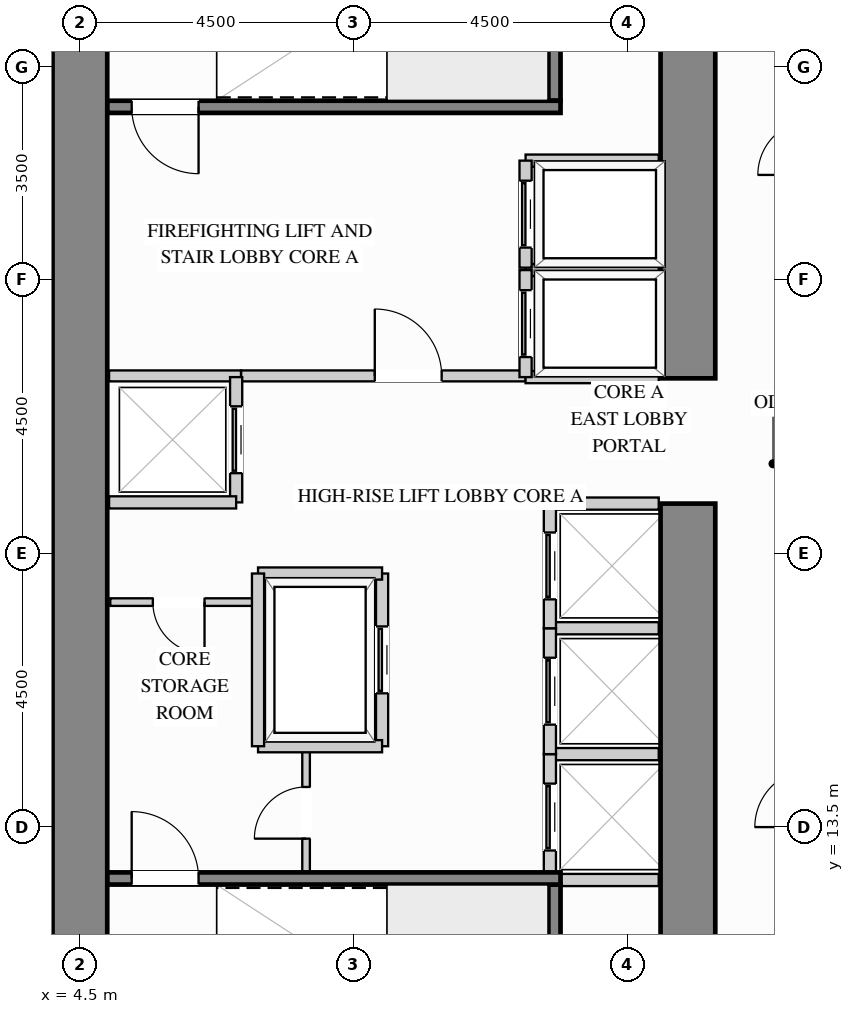
"""IFC4 building model, lengths in metres.
Left out: names, types, materials, properties, quantities, classifications, styles, units other than length and angle.
Written with IfcOpenShell. Run it as: python <this file> out.ifc"""

import sys

from ifc_helpers import new_model, si_unit, direction, frame, frame_2d, origin, place, context, subcontext, project, spatial, rectangle, extrude, source, transform, mapped, element, fill, save


model = new_model("IFC4")
c1 = context("Model", 3, precision=1e-05, world=origin(), true_north=direction((0.0, 1.0)))
c2 = subcontext(c1, "Body", "Model", "MODEL_VIEW")
j1 = project(units=[si_unit("LENGTHUNIT", "METRE"), si_unit("PLANEANGLEUNIT", "RADIAN")], contexts=[c1])
p1 = place(None, origin())
s1 = spatial("IfcSite", under=j1, at=p1, CompositionType="ELEMENT")
p2 = place(p1, origin())
s2 = spatial("IfcBuilding", under=s1, at=p2, CompositionType="ELEMENT")
p3 = place(p2, frame((0.0, 0.0, 29.7)))
s3 = spatial("IfcBuildingStorey", under=s2, at=p3, CompositionType="ELEMENT", Elevation=29.7)
m1 = source(origin(), c2, "Body", "SweptSolid", [
    extrude(rectangle(XDim=9.87, YDim=0.9, at=frame_2d((4.935, 0.0))), origin(), (0.0, 0.0, 1.0), 3.38),
])
p4 = place(p3, frame((14.5, 8.95, 0.0), z_axis=(0.0, 0.0, 1.0), x_axis=(0.0, 1.0, 0.0)))
e1 = element("IfcWall", 1, at=p4, inside=s3, PredefinedType="SHEAR", context=c2, shape_type="MappedRepresentation", body=[
    mapped(m1, transform((0.0, 0.0, 0.0), x_axis=(1.0, 0.0, 0.0), y_axis=(0.0, 1.0, 0.0), z_axis=(0.0, 0.0, 1.0))),
])
m2 = source(origin(), c2, "Body", "SweptSolid", [
    extrude(rectangle(XDim=8.17, YDim=0.9, at=frame_2d((4.085, 0.0))), origin(), (0.0, 0.0, 1.0), 3.38),
])
p5 = place(p3, frame((14.5, 20.88, 0.0), z_axis=(0.0, 0.0, 1.0), x_axis=(0.0, 1.0, 0.0)))
e2 = element("IfcWall", 2, at=p5, inside=s3, PredefinedType="SHEAR", context=c2, shape_type="MappedRepresentation", body=[
    mapped(m2, transform((0.0, 0.0, 0.0), x_axis=(1.0, 0.0, 0.0), y_axis=(0.0, 1.0, 0.0), z_axis=(0.0, 0.0, 1.0))),
])
m3 = source(origin(), c2, "Body", "SweptSolid", [
    extrude(rectangle(XDim=20.1, YDim=0.9, at=frame_2d((10.05, 0.0))), origin(), (0.0, 0.0, 1.0), 3.38),
])
p6 = place(p3, frame((4.5, 8.95, 0.0), z_axis=(0.0, 0.0, 1.0), x_axis=(0.0, 1.0, 0.0)))
e3 = element("IfcWall", 3, at=p6, inside=s3, PredefinedType="SHEAR", context=c2, shape_type="MappedRepresentation", body=[
    mapped(m3, transform((0.0, 0.0, 0.0), x_axis=(1.0, 0.0, 0.0), y_axis=(0.0, 1.0, 0.0), z_axis=(0.0, 0.0, 1.0))),
])
p7 = place(p3, frame((7.15, 20.92, 0.0), z_axis=(0.0, 0.0, 1.0), x_axis=(1.0, 0.0, 0.0)))
e4 = element("IfcWall", 4, at=p7, inside=s3, PredefinedType="PARTITIONING", context=c2, shape_type="SweptSolid", body=[
    extrude(rectangle(XDim=4.68, YDim=0.18, at=frame_2d((2.34, 0.0))), origin(), (0.0, 0.0, 1.0), 3.365),
])
p8 = place(p7, frame((2.2, 0.0, 0.0)))
e5 = element("IfcOpeningElement", 5, at=p8, cuts=e4, PredefinedType="OPENING", context=c2, shape_type="SweptSolid", body=[
    extrude(rectangle(XDim=1.1, YDim=2.15, at=frame_2d((0.55, 1.075))), frame((0.0, 0.1, 0.0), z_axis=(0.0, -1.0, 0.0), x_axis=(1.0, 0.0, 0.0)), (0.0, 0.0, 1.0), 0.2),
])
m4 = source(origin(), c2, "Body", "SweptSolid", [
    extrude(rectangle(XDim=2.17, YDim=0.18, at=frame_2d((1.085, 0.0))), origin(), (0.0, 0.0, 1.0), 3.365),
])
p9 = place(p3, frame((4.98, 20.92, 0.0), z_axis=(0.0, 0.0, 1.0), x_axis=(1.0, 0.0, 0.0)))
e6 = element("IfcWall", 6, at=p9, inside=s3, PredefinedType="PARTITIONING", context=c2, shape_type="MappedRepresentation", body=[
    mapped(m4, transform((0.0, 0.0, 0.0), x_axis=(1.0, 0.0, 0.0), y_axis=(0.0, 1.0, 0.0), z_axis=(0.0, 0.0, 1.0))),
])
p10 = place(p3, frame((8.22, 12.75, 0.0), z_axis=(0.0, 0.0, 1.0), x_axis=(0.0, 1.0, 0.0)))
e7 = element("IfcWall", 7, at=p10, inside=s3, PredefinedType="PARTITIONING", context=c2, shape_type="SweptSolid", body=[
    extrude(rectangle(XDim=2.07, YDim=0.125, at=frame_2d((1.035, 0.0))), origin(), (0.0, 0.0, 1.0), 3.365),
])
p11 = place(p10, frame((0.56, 0.0, 0.0)))
e8 = element("IfcOpeningElement", 8, at=p11, cuts=e7, PredefinedType="OPENING", context=c2, shape_type="SweptSolid", body=[
    extrude(rectangle(XDim=0.85, YDim=2.1, at=frame_2d((0.425, 1.05))), frame((0.0, 0.073, 0.0), z_axis=(0.0, -1.0, 0.0), x_axis=(1.0, 0.0, 0.0)), (0.0, 0.0, 1.0), 0.145),
])
p12 = place(p3, frame((5.0, 17.2, 0.0), z_axis=(0.0, 0.0, 1.0), x_axis=(1.0, 0.0, 0.0)))
e9 = element("IfcWall", 9, at=p12, inside=s3, PredefinedType="PARTITIONING", context=c2, shape_type="SweptSolid", body=[
    extrude(rectangle(XDim=2.4, YDim=0.125, at=frame_2d((1.2, 0.0))), origin(), (0.0, 0.0, 1.0), 3.365),
])
p13 = place(p12, frame((0.7, 0.0, 0.0)))
e10 = element("IfcOpeningElement", 10, at=p13, cuts=e9, PredefinedType="OPENING", context=c2, shape_type="SweptSolid", body=[
    extrude(rectangle(XDim=0.85, YDim=2.1, at=frame_2d((0.425, 1.05))), frame((0.0, 0.073, 0.0), z_axis=(0.0, -1.0, 0.0), x_axis=(1.0, 0.0, 0.0)), (0.0, 0.0, 1.0), 0.145),
])
m5 = source(origin(), c2, "Body", "SweptSolid", [
    extrude(rectangle(XDim=2.19, YDim=0.2, at=frame_2d((1.095, 0.0))), origin(), (0.0, 0.0, 1.0), 3.365),
])
for number, where, z_axis, x_axis in (
    (11, (11.83, 22.66, 0.0), (0.0, 0.0, 1.0), (1.0, 0.0, 0.0)),
    (12, (11.83, 20.9, 0.0), (0.0, 0.0, 1.0), (1.0, 0.0, 0.0)),
):
    element("IfcWall", number, at=place(p3, frame(where, z_axis=z_axis, x_axis=x_axis)), inside=s3, PredefinedType="PARTITIONING", context=c2, shape_type="MappedRepresentation", body=[
        mapped(m5, transform((0.0, 0.0, 0.0), x_axis=(1.0, 0.0, 0.0), y_axis=(0.0, 1.0, 0.0), z_axis=(0.0, 0.0, 1.0))),
    ])
p14 = place(p3, frame((11.83, 20.9, 0.0), z_axis=(0.0, 0.0, 1.0), x_axis=(0.0, 1.0, 0.0)))
e13 = element("IfcWall", 13, at=p14, inside=s3, PredefinedType="PARTITIONING", context=c2, shape_type="SweptSolid", body=[
    extrude(rectangle(XDim=1.76, YDim=0.2, at=frame_2d((0.88, 0.0))), origin(), (0.0, 0.0, 1.0), 3.365),
])
p15 = place(p14, frame((0.33, 0.0, 0.0)))
e14 = element("IfcOpeningElement", 14, at=p15, cuts=e13, PredefinedType="OPENING", context=c2, shape_type="SweptSolid", body=[
    extrude(rectangle(XDim=1.1, YDim=2.2, at=frame_2d((0.55, 1.1))), frame((0.0, 0.11, 0.0), z_axis=(0.0, -1.0, 0.0), x_axis=(1.0, 0.0, 0.0)), (0.0, 0.0, 1.0), 0.22),
])
p16 = place(p3, frame((11.83, 24.46, 0.0), z_axis=(0.0, 0.0, 1.0), x_axis=(1.0, 0.0, 0.0)))
e15 = element("IfcWall", 15, at=p16, inside=s3, PredefinedType="PARTITIONING", context=c2, shape_type="MappedRepresentation", body=[
    mapped(m5, transform((0.0, 0.0, 0.0), x_axis=(1.0, 0.0, 0.0), y_axis=(0.0, 1.0, 0.0), z_axis=(0.0, 0.0, 1.0))),
])
p17 = place(p3, frame((11.83, 22.7, 0.0), z_axis=(0.0, 0.0, 1.0), x_axis=(0.0, 1.0, 0.0)))
e16 = element("IfcWall", 16, at=p17, inside=s3, PredefinedType="PARTITIONING", context=c2, shape_type="SweptSolid", body=[
    extrude(rectangle(XDim=1.76, YDim=0.2, at=frame_2d((0.88, 0.0))), origin(), (0.0, 0.0, 1.0), 3.365),
])
p18 = place(p17, frame((0.33, 0.0, 0.0)))
e17 = element("IfcOpeningElement", 17, at=p18, cuts=e16, PredefinedType="OPENING", context=c2, shape_type="SweptSolid", body=[
    extrude(rectangle(XDim=1.1, YDim=2.2, at=frame_2d((0.55, 1.1))), frame((0.0, 0.11, 0.0), z_axis=(0.0, -1.0, 0.0), x_axis=(1.0, 0.0, 0.0)), (0.0, 0.0, 1.0), 0.22),
])
m6 = source(origin(), c2, "Body", "SweptSolid", [
    extrude(rectangle(XDim=1.79, YDim=0.2, at=frame_2d((0.895, 0.0))), origin(), (0.0, 0.0, 1.0), 3.365),
])
for number, where, z_axis, x_axis in (
    (18, (12.23, 14.7, 0.0), (0.0, 0.0, 1.0), (1.0, 0.0, 0.0)),
    (19, (12.23, 12.63, 0.0), (0.0, 0.0, 1.0), (1.0, 0.0, 0.0)),
):
    element("IfcWall", number, at=place(p3, frame(where, z_axis=z_axis, x_axis=x_axis)), inside=s3, PredefinedType="PARTITIONING", context=c2, shape_type="MappedRepresentation", body=[
        mapped(m6, transform((0.0, 0.0, 0.0), x_axis=(1.0, 0.0, 0.0), y_axis=(0.0, 1.0, 0.0), z_axis=(0.0, 0.0, 1.0))),
    ])
p19 = place(p3, frame((12.23, 12.63, 0.0), z_axis=(0.0, 0.0, 1.0), x_axis=(0.0, 1.0, 0.0)))
e20 = element("IfcWall", 20, at=p19, inside=s3, PredefinedType="PARTITIONING", context=c2, shape_type="SweptSolid", body=[
    extrude(rectangle(XDim=2.07, YDim=0.2, at=frame_2d((1.035, 0.0))), origin(), (0.0, 0.0, 1.0), 3.365),
])
p20 = place(p19, frame((0.485, 0.0, 0.0)))
e21 = element("IfcOpeningElement", 21, at=p20, cuts=e20, PredefinedType="OPENING", context=c2, shape_type="SweptSolid", body=[
    extrude(rectangle(XDim=1.1, YDim=2.2, at=frame_2d((0.55, 1.1))), frame((0.0, 0.11, 0.0), z_axis=(0.0, -1.0, 0.0), x_axis=(1.0, 0.0, 0.0)), (0.0, 0.0, 1.0), 0.22),
])
p21 = place(p3, frame((12.23, 16.77, 0.0), z_axis=(0.0, 0.0, 1.0), x_axis=(1.0, 0.0, 0.0)))
e22 = element("IfcWall", 22, at=p21, inside=s3, PredefinedType="PARTITIONING", context=c2, shape_type="MappedRepresentation", body=[
    mapped(m6, transform((0.0, 0.0, 0.0), x_axis=(1.0, 0.0, 0.0), y_axis=(0.0, 1.0, 0.0), z_axis=(0.0, 0.0, 1.0))),
])
p22 = place(p3, frame((12.23, 14.7, 0.0), z_axis=(0.0, 0.0, 1.0), x_axis=(0.0, 1.0, 0.0)))
e23 = element("IfcWall", 23, at=p22, inside=s3, PredefinedType="PARTITIONING", context=c2, shape_type="SweptSolid", body=[
    extrude(rectangle(XDim=2.07, YDim=0.2, at=frame_2d((1.035, 0.0))), origin(), (0.0, 0.0, 1.0), 3.365),
])
p23 = place(p22, frame((0.485, 0.0, 0.0)))
e24 = element("IfcOpeningElement", 24, at=p23, cuts=e23, PredefinedType="OPENING", context=c2, shape_type="SweptSolid", body=[
    extrude(rectangle(XDim=1.1, YDim=2.2, at=frame_2d((0.55, 1.1))), frame((0.0, 0.11, 0.0), z_axis=(0.0, -1.0, 0.0), x_axis=(1.0, 0.0, 0.0)), (0.0, 0.0, 1.0), 0.22),
])
p24 = place(p3, frame((12.23, 18.82, 0.0), z_axis=(0.0, 0.0, 1.0), x_axis=(1.0, 0.0, 0.0)))
e25 = element("IfcWall", 25, at=p24, inside=s3, PredefinedType="PARTITIONING", context=c2, shape_type="MappedRepresentation", body=[
    mapped(m6, transform((0.0, 0.0, 0.0), x_axis=(1.0, 0.0, 0.0), y_axis=(0.0, 1.0, 0.0), z_axis=(0.0, 0.0, 1.0))),
])
p25 = place(p3, frame((12.23, 16.77, 0.0), z_axis=(0.0, 0.0, 1.0), x_axis=(0.0, 1.0, 0.0)))
e26 = element("IfcWall", 26, at=p25, inside=s3, PredefinedType="PARTITIONING", context=c2, shape_type="SweptSolid", body=[
    extrude(rectangle(XDim=2.05, YDim=0.2, at=frame_2d((1.025, 0.0))), origin(), (0.0, 0.0, 1.0), 3.365),
])
p26 = place(p25, frame((0.475, 0.0, 0.0)))
e27 = element("IfcOpeningElement", 27, at=p26, cuts=e26, PredefinedType="OPENING", context=c2, shape_type="SweptSolid", body=[
    extrude(rectangle(XDim=1.1, YDim=2.2, at=frame_2d((0.55, 1.1))), frame((0.0, 0.11, 0.0), z_axis=(0.0, -1.0, 0.0), x_axis=(1.0, 0.0, 0.0)), (0.0, 0.0, 1.0), 0.22),
])
p27 = place(p3, frame((7.07, 18.84, 0.0), z_axis=(0.0, 0.0, 1.0), x_axis=(0.0, 1.0, 0.0)))
e28 = element("IfcWall", 28, at=p27, inside=s3, PredefinedType="PARTITIONING", context=c2, shape_type="SweptSolid", body=[
    extrude(rectangle(XDim=2.06, YDim=0.2, at=frame_2d((1.03, 0.0))), origin(), (0.0, 0.0, 1.0), 3.365),
])
p28 = place(p27, frame((0.48, 0.0, 0.0)))
e29 = element("IfcOpeningElement", 29, at=p28, cuts=e28, PredefinedType="OPENING", context=c2, shape_type="SweptSolid", body=[
    extrude(rectangle(XDim=1.1, YDim=2.2, at=frame_2d((0.55, 1.1))), frame((0.0, 0.11, 0.0), z_axis=(0.0, -1.0, 0.0), x_axis=(1.0, 0.0, 0.0)), (0.0, 0.0, 1.0), 0.22),
])
m7 = source(origin(), c2, "Body", "SweptSolid", [
    extrude(rectangle(XDim=2.09, YDim=0.2, at=frame_2d((1.045, 0.0))), origin(), (0.0, 0.0, 1.0), 3.365),
])
p29 = place(p3, frame((4.98, 18.84, 0.0), z_axis=(0.0, 0.0, 1.0), x_axis=(1.0, 0.0, 0.0)))
e30 = element("IfcWall", 30, at=p29, inside=s3, PredefinedType="PARTITIONING", context=c2, shape_type="MappedRepresentation", body=[
    mapped(m7, transform((0.0, 0.0, 0.0), x_axis=(1.0, 0.0, 0.0), y_axis=(0.0, 1.0, 0.0), z_axis=(0.0, 0.0, 1.0))),
])
p30 = place(p3, frame((9.47, 14.83, 0.0), z_axis=(0.0, 0.0, 1.0), x_axis=(0.0, 1.0, 0.0)))
e31 = element("IfcWall", 31, at=p30, inside=s3, PredefinedType="PARTITIONING", context=c2, shape_type="SweptSolid", body=[
    extrude(rectangle(XDim=2.84, YDim=0.2, at=frame_2d((1.42, 0.0))), origin(), (0.0, 0.0, 1.0), 3.365),
])
p31 = place(p30, frame((0.87, 0.0, 0.0)))
e32 = element("IfcOpeningElement", 32, at=p31, cuts=e31, PredefinedType="OPENING", context=c2, shape_type="SweptSolid", body=[
    extrude(rectangle(XDim=1.1, YDim=2.2, at=frame_2d((0.55, 1.1))), frame((0.0, 0.11, 0.0), z_axis=(0.0, -1.0, 0.0), x_axis=(1.0, 0.0, 0.0)), (0.0, 0.0, 1.0), 0.22),
])
m8 = source(origin(), c2, "Body", "SweptSolid", [
    extrude(rectangle(XDim=2.04, YDim=0.2, at=frame_2d((1.02, 0.0))), origin(), (0.0, 0.0, 1.0), 3.365),
])
for number, where, z_axis, x_axis in (
    (33, (7.43, 17.67, 0.0), (0.0, 0.0, 1.0), (1.0, 0.0, 0.0)),
    (34, (7.43, 14.83, 0.0), (0.0, 0.0, 1.0), (1.0, 0.0, 0.0)),
):
    element("IfcWall", number, at=place(p3, frame(where, z_axis=z_axis, x_axis=x_axis)), inside=s3, PredefinedType="PARTITIONING", context=c2, shape_type="MappedRepresentation", body=[
        mapped(m8, transform((0.0, 0.0, 0.0), x_axis=(1.0, 0.0, 0.0), y_axis=(0.0, 1.0, 0.0), z_axis=(0.0, 0.0, 1.0))),
    ])
m9 = source(origin(), c2, "Body", "SweptSolid", [
    extrude(rectangle(XDim=2.84, YDim=0.2, at=frame_2d((1.42, 0.0))), origin(), (0.0, 0.0, 1.0), 3.365),
])
p32 = place(p3, frame((7.43, 14.83, 0.0), z_axis=(0.0, 0.0, 1.0), x_axis=(0.0, 1.0, 0.0)))
e35 = element("IfcWall", 35, at=p32, inside=s3, PredefinedType="PARTITIONING", context=c2, shape_type="MappedRepresentation", body=[
    mapped(m9, transform((0.0, 0.0, 0.0), x_axis=(1.0, 0.0, 0.0), y_axis=(0.0, 1.0, 0.0), z_axis=(0.0, 0.0, 1.0))),
])
m10 = source(origin(), c2, "Body", "SweptSolid", [
    extrude(rectangle(XDim=3.603, YDim=0.2, at=frame_2d((1.802, 0.0))), origin(), (0.0, 0.0, 1.0), 3.38),
])
p33 = place(p3, frame((12.305, 8.952, 0.0), z_axis=(0.0, 0.0, 1.0), x_axis=(0.0, 1.0, 0.0)))
e36 = element("IfcWall", 36, at=p33, inside=s3, PredefinedType="SHEAR", context=c2, shape_type="MappedRepresentation", body=[
    mapped(m10, transform((0.0, 0.0, 0.0), x_axis=(1.0, 0.0, 0.0), y_axis=(0.0, 1.0, 0.0), z_axis=(0.0, 0.0, 1.0))),
])
p34 = place(p3, frame((4.952, 12.655, 0.0), z_axis=(0.0, 0.0, 1.0), x_axis=(1.0, 0.0, 0.0)))
e37 = element("IfcWall", 37, at=p34, inside=s3, PredefinedType="SHEAR", context=c2, shape_type="SweptSolid", body=[
    extrude(rectangle(XDim=7.453, YDim=0.2, at=frame_2d((3.727, 0.0))), origin(), (0.0, 0.0, 1.0), 3.38),
])
p35 = place(p34, frame((0.4, 0.0, 0.0)))
e38 = element("IfcOpeningElement", 38, at=p35, cuts=e37, PredefinedType="OPENING", context=c2, shape_type="SweptSolid", body=[
    extrude(rectangle(XDim=1.1, YDim=2.15, at=frame_2d((0.55, 1.075))), frame((0.0, 0.11, 0.0), z_axis=(0.0, -1.0, 0.0), x_axis=(1.0, 0.0, 0.0)), (0.0, 0.0, 1.0), 0.22),
])
p36 = place(p3, frame((12.305, 25.445, 0.0), z_axis=(0.0, 0.0, 1.0), x_axis=(0.0, 1.0, 0.0)))
e39 = element("IfcWall", 39, at=p36, inside=s3, PredefinedType="SHEAR", context=c2, shape_type="MappedRepresentation", body=[
    mapped(m10, transform((0.0, 0.0, 0.0), x_axis=(1.0, 0.0, 0.0), y_axis=(0.0, 1.0, 0.0), z_axis=(0.0, 0.0, 1.0))),
])
p37 = place(p3, frame((4.952, 25.345, 0.0), z_axis=(0.0, 0.0, 1.0), x_axis=(1.0, 0.0, 0.0)))
e40 = element("IfcWall", 40, at=p37, inside=s3, PredefinedType="SHEAR", context=c2, shape_type="SweptSolid", body=[
    extrude(rectangle(XDim=7.453, YDim=0.2, at=frame_2d((3.727, 0.0))), origin(), (0.0, 0.0, 1.0), 3.38),
])
p38 = place(p37, frame((0.4, 0.0, 0.0)))
e41 = element("IfcOpeningElement", 41, at=p38, cuts=e40, PredefinedType="OPENING", context=c2, shape_type="SweptSolid", body=[
    extrude(rectangle(XDim=1.1, YDim=2.15, at=frame_2d((0.55, 1.075))), frame((0.0, 0.11, 0.0), z_axis=(0.0, -1.0, 0.0), x_axis=(1.0, 0.0, 0.0)), (0.0, 0.0, 1.0), 0.22),
])
m11 = source(origin(), c2, "Body", "SweptSolid", [
    extrude(rectangle(XDim=1.1, YDim=2.15, at=frame_2d((0.55, 1.075))), frame((0.0, 0.025, 0.0), z_axis=(0.0, -1.0, 0.0), x_axis=(1.0, 0.0, 0.0)), (0.0, 0.0, 1.0), 0.05),
])
p39 = place(p8, origin())
e42 = element("IfcDoor", 42, at=p39, inside=s3, OperationType="SINGLE_SWING_LEFT", PredefinedType="DOOR", context=c2, shape_type="MappedRepresentation", body=[
    mapped(m11, transform((0.0, 0.0, 0.0), x_axis=(1.0, 0.0, 0.0), y_axis=(0.0, 1.0, 0.0), z_axis=(0.0, 0.0, 1.0))),
])
fill(e5, e42)
m12 = source(origin(), c2, "Body", "SweptSolid", [
    extrude(rectangle(XDim=1.1, YDim=2.2, at=frame_2d((0.55, 1.1))), frame((0.0, 0.025, 0.0), z_axis=(0.0, -1.0, 0.0), x_axis=(1.0, 0.0, 0.0)), (0.0, 0.0, 1.0), 0.05),
])
p40 = place(p15, origin())
e43 = element("IfcDoor", 43, at=p40, inside=s3, OperationType="SLIDING_TO_LEFT", PredefinedType="DOOR", context=c2, shape_type="MappedRepresentation", body=[
    mapped(m12, transform((0.0, 0.0, 0.0), x_axis=(1.0, 0.0, 0.0), y_axis=(0.0, 1.0, 0.0), z_axis=(0.0, 0.0, 1.0))),
])
fill(e14, e43)
p41 = place(p18, origin())
e44 = element("IfcDoor", 44, at=p41, inside=s3, OperationType="SLIDING_TO_LEFT", PredefinedType="DOOR", context=c2, shape_type="MappedRepresentation", body=[
    mapped(m12, transform((0.0, 0.0, 0.0), x_axis=(1.0, 0.0, 0.0), y_axis=(0.0, 1.0, 0.0), z_axis=(0.0, 0.0, 1.0))),
])
fill(e17, e44)
p42 = place(p20, origin())
e45 = element("IfcDoor", 45, at=p42, inside=s3, OperationType="SLIDING_TO_LEFT", PredefinedType="DOOR", context=c2, shape_type="MappedRepresentation", body=[
    mapped(m12, transform((0.0, 0.0, 0.0), x_axis=(1.0, 0.0, 0.0), y_axis=(0.0, 1.0, 0.0), z_axis=(0.0, 0.0, 1.0))),
])
fill(e21, e45)
p43 = place(p23, origin())
e46 = element("IfcDoor", 46, at=p43, inside=s3, OperationType="SLIDING_TO_LEFT", PredefinedType="DOOR", context=c2, shape_type="MappedRepresentation", body=[
    mapped(m12, transform((0.0, 0.0, 0.0), x_axis=(1.0, 0.0, 0.0), y_axis=(0.0, 1.0, 0.0), z_axis=(0.0, 0.0, 1.0))),
])
fill(e24, e46)
p44 = place(p26, origin())
e47 = element("IfcDoor", 47, at=p44, inside=s3, OperationType="SLIDING_TO_LEFT", PredefinedType="DOOR", context=c2, shape_type="MappedRepresentation", body=[
    mapped(m12, transform((0.0, 0.0, 0.0), x_axis=(1.0, 0.0, 0.0), y_axis=(0.0, 1.0, 0.0), z_axis=(0.0, 0.0, 1.0))),
])
fill(e27, e47)
p45 = place(p28, origin())
e48 = element("IfcDoor", 48, at=p45, inside=s3, OperationType="SLIDING_TO_LEFT", PredefinedType="DOOR", context=c2, shape_type="MappedRepresentation", body=[
    mapped(m12, transform((0.0, 0.0, 0.0), x_axis=(1.0, 0.0, 0.0), y_axis=(0.0, 1.0, 0.0), z_axis=(0.0, 0.0, 1.0))),
])
fill(e29, e48)
p46 = place(p31, origin())
e49 = element("IfcDoor", 49, at=p46, inside=s3, OperationType="SLIDING_TO_LEFT", PredefinedType="DOOR", context=c2, shape_type="MappedRepresentation", body=[
    mapped(m12, transform((0.0, 0.0, 0.0), x_axis=(1.0, 0.0, 0.0), y_axis=(0.0, 1.0, 0.0), z_axis=(0.0, 0.0, 1.0))),
])
fill(e32, e49)
m13 = source(origin(), c2, "Body", "SweptSolid", [
    extrude(rectangle(XDim=0.85, YDim=2.1, at=frame_2d((0.425, 1.05))), frame((0.0, 0.025, 0.0), z_axis=(0.0, -1.0, 0.0), x_axis=(1.0, 0.0, 0.0)), (0.0, 0.0, 1.0), 0.05),
])
p47 = place(p13, origin())
e50 = element("IfcDoor", 50, at=p47, inside=s3, OperationType="SINGLE_SWING_RIGHT", PredefinedType="DOOR", context=c2, shape_type="MappedRepresentation", body=[
    mapped(m13, transform((0.0, 0.0, 0.0), x_axis=(1.0, 0.0, 0.0), y_axis=(0.0, 1.0, 0.0), z_axis=(0.0, 0.0, 1.0))),
])
fill(e10, e50)
p48 = place(p11, origin())
e51 = element("IfcDoor", 51, at=p48, inside=s3, OperationType="SINGLE_SWING_LEFT", PredefinedType="DOOR", context=c2, shape_type="MappedRepresentation", body=[
    mapped(m13, transform((0.0, 0.0, 0.0), x_axis=(1.0, 0.0, 0.0), y_axis=(0.0, 1.0, 0.0), z_axis=(0.0, 0.0, 1.0))),
])
fill(e8, e51)
m14 = source(origin(), c2, "Body", "SweptSolid", [
    extrude(rectangle(XDim=1.1, YDim=2.15, at=frame_2d((0.55, 1.075))), frame((0.0, 0.025, 0.0), z_axis=(0.0, -1.0, 0.0), x_axis=(1.0, 0.0, 0.0)), (0.0, 0.0, 1.0), 0.05),
])
p49 = place(p35, origin())
e52 = element("IfcDoor", 52, at=p49, inside=s3, OperationType="SINGLE_SWING_LEFT", PredefinedType="DOOR", context=c2, shape_type="MappedRepresentation", body=[
    mapped(m14, transform((0.0, 0.0, 0.0), x_axis=(1.0, 0.0, 0.0), y_axis=(0.0, 1.0, 0.0), z_axis=(0.0, 0.0, 1.0))),
])
fill(e38, e52)
p50 = place(p38, origin())
e53 = element("IfcDoor", 53, at=p50, inside=s3, OperationType="SINGLE_SWING_RIGHT", PredefinedType="DOOR", context=c2, shape_type="MappedRepresentation", body=[
    mapped(m14, transform((0.0, 0.0, 0.0), x_axis=(1.0, 0.0, 0.0), y_axis=(0.0, 1.0, 0.0), z_axis=(0.0, 0.0, 1.0))),
])
fill(e41, e53)
save(model, sys.argv[1])
